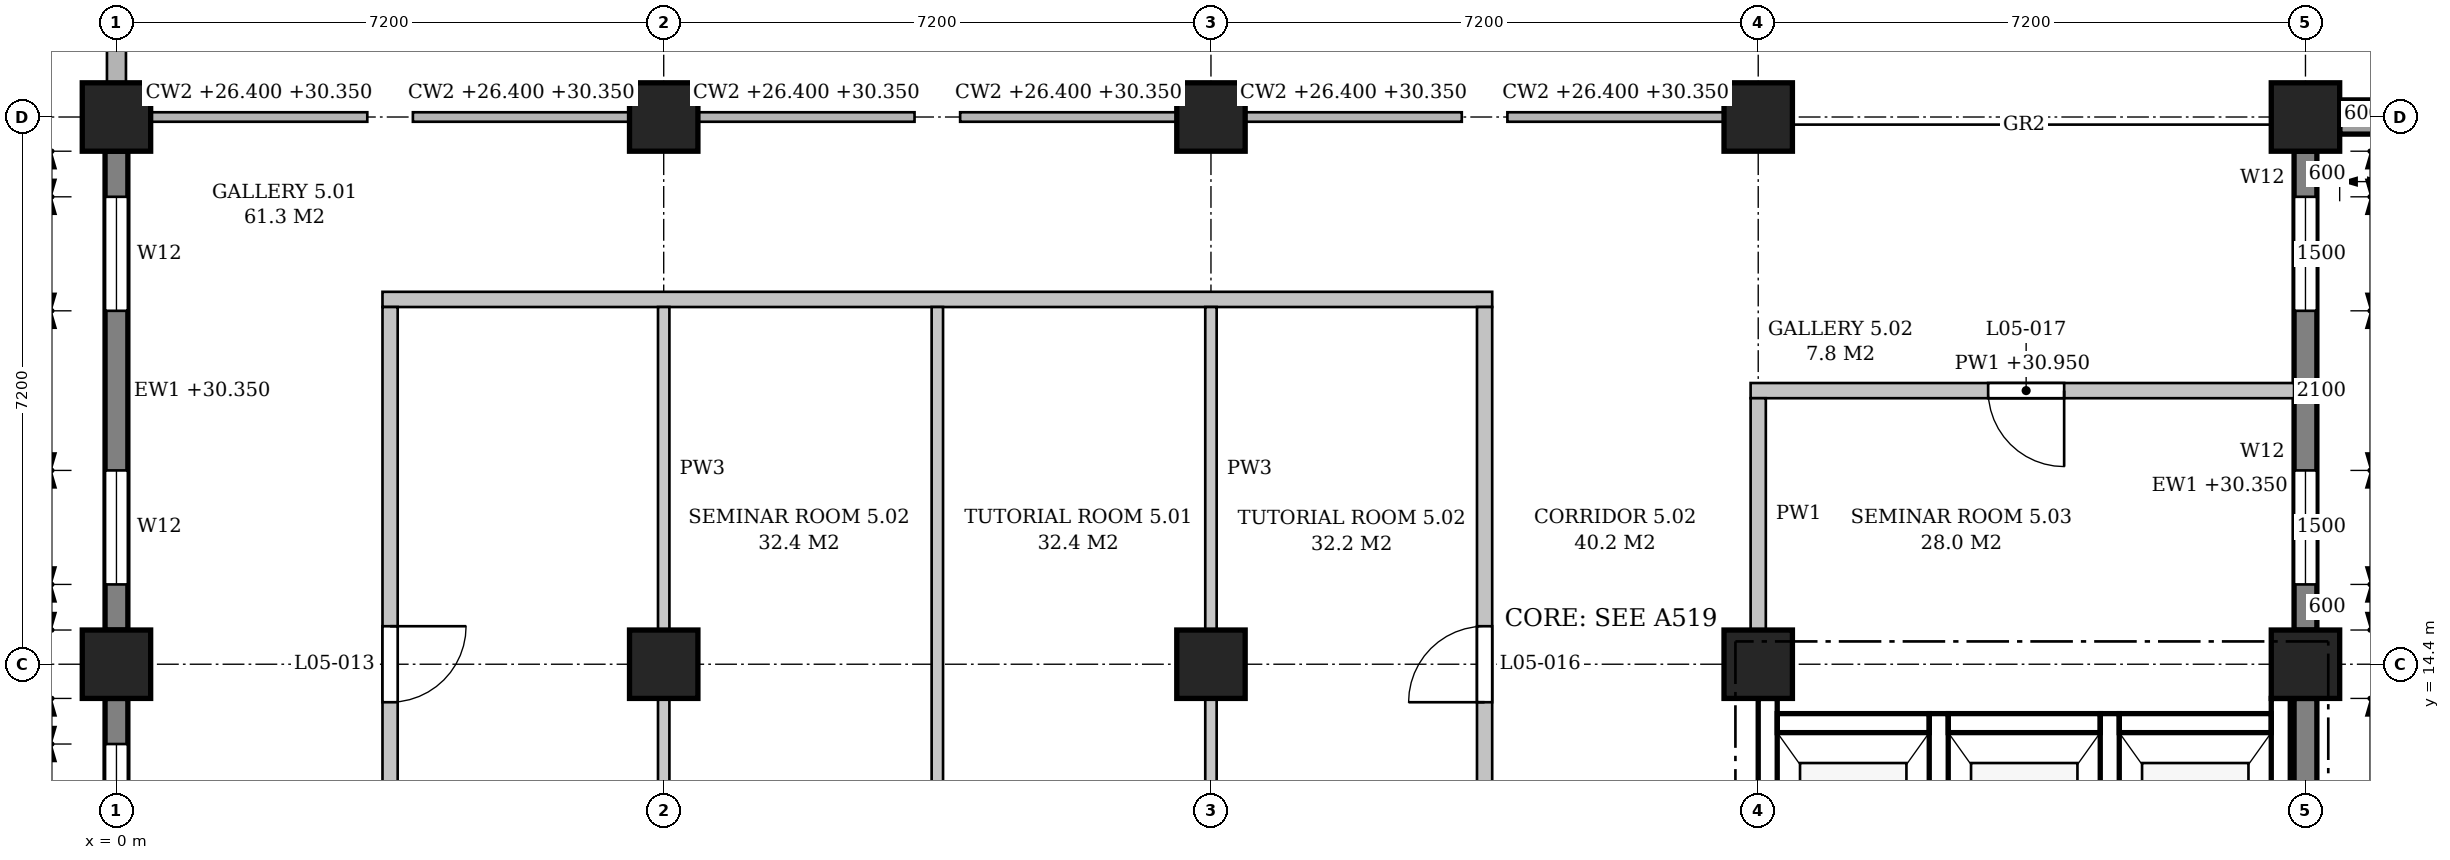
"""IFC4 building model, lengths in metres.
Left out: names, types, materials, properties, quantities, classifications, styles, units other than length and angle.
Written with IfcOpenShell. Run it as: python <this file> out.ifc"""

import sys

from ifc_helpers import new_model, si_unit, direction, frame, frame_2d, origin, origin_2d, place, context, subcontext, project, spatial, polyline, rectangle, outline, extrude, element, fill, save


model = new_model("IFC4")
c1 = context("Model", 3, precision=1e-05, world=origin(), true_north=direction((0.0, 1.0)))
c2 = subcontext(c1, "Body", "Model", "MODEL_VIEW")
j1 = project(units=[si_unit("LENGTHUNIT", "METRE"), si_unit("PLANEANGLEUNIT", "RADIAN")], contexts=[c1])
p1 = place(None, origin())
s1 = spatial("IfcSite", under=j1, at=p1, CompositionType="ELEMENT")
p2 = place(p1, origin())
s2 = spatial("IfcBuilding", under=s1, at=p2, CompositionType="ELEMENT")
p3 = place(p2, frame((0.0, 0.0, 26.4)))
s3 = spatial("IfcBuildingStorey", under=s2, at=p3, CompositionType="ELEMENT", Elevation=26.4)
for number, where, z_axis, x_axis in (
    (1, (0.0, 14.4, 0.0), (0.0, 0.0, 1.0), (1.0, 0.0, 0.0)),
    (2, (0.0, 21.6, 0.0), (0.0, 0.0, 1.0), (1.0, 0.0, 0.0)),
    (3, (7.2, 14.4, 0.0), (0.0, 0.0, 1.0), (1.0, 0.0, 0.0)),
    (4, (7.2, 21.6, 0.0), (0.0, 0.0, 1.0), (1.0, 0.0, 0.0)),
    (5, (14.4, 14.4, 0.0), (0.0, 0.0, 1.0), (1.0, 0.0, 0.0)),
    (6, (14.4, 21.6, 0.0), (0.0, 0.0, 1.0), (1.0, 0.0, 0.0)),
    (7, (21.6, 14.4, 0.0), (0.0, 0.0, 1.0), (1.0, 0.0, 0.0)),
    (8, (21.6, 21.6, 0.0), (0.0, 0.0, 1.0), (1.0, 0.0, 0.0)),
    (9, (28.8, 14.4, 0.0), (0.0, 0.0, 1.0), (1.0, 0.0, 0.0)),
    (10, (28.8, 21.6, 0.0), (0.0, 0.0, 1.0), (1.0, 0.0, 0.0)),
):
    element("IfcColumn", number, at=place(p3, frame(where, z_axis=z_axis, x_axis=x_axis)), inside=s3, PredefinedType="COLUMN", context=c2, shape_type="SweptSolid", body=[
        extrude(rectangle(XDim=0.9, YDim=0.9, at=origin_2d()), origin(), (0.0, 0.0, 1.0), 4.8),
    ])
p4 = place(p3, frame((0.0, 7.65, 0.0), z_axis=(0.0, 0.0, 1.0), x_axis=(0.0, 1.0, 0.0)))
e11 = element("IfcWall", 11, at=p4, inside=s3, PredefinedType="STANDARD", context=c2, shape_type="SweptSolid", body=[
    extrude(rectangle(XDim=6.3, YDim=0.3, at=frame_2d((3.15, 0.0))), origin(), (0.0, 0.0, 1.0), 3.95),
])
p5 = place(p4, frame((0.6, 0.0, 0.9)))
e12 = element("IfcOpeningElement", 12, at=p5, cuts=e11, PredefinedType="OPENING", context=c2, shape_type="SweptSolid", body=[
    extrude(outline(polyline([(0.0, 0.0), (1.5, 0.0), (1.5, 1.75), (0.75, 2.5), (0.0, 1.75), (0.0, 0.0)])), frame((0.0, 0.16, 0.0), z_axis=(0.0, -1.0, 0.0), x_axis=(1.0, 0.0, 0.0)), (0.0, 0.0, 1.0), 0.32),
])
p6 = place(p4, frame((4.2, 0.0, 0.9)))
e13 = element("IfcOpeningElement", 13, at=p6, cuts=e11, PredefinedType="OPENING", context=c2, shape_type="SweptSolid", body=[
    extrude(outline(polyline([(0.0, 0.0), (1.5, 0.0), (1.5, 1.75), (0.75, 2.5), (0.0, 1.75), (0.0, 0.0)])), frame((0.0, 0.16, 0.0), z_axis=(0.0, -1.0, 0.0), x_axis=(1.0, 0.0, 0.0)), (0.0, 0.0, 1.0), 0.32),
])
p7 = place(p3, frame((0.0, 14.85, 0.0), z_axis=(0.0, 0.0, 1.0), x_axis=(0.0, 1.0, 0.0)))
e14 = element("IfcWall", 14, at=p7, inside=s3, PredefinedType="STANDARD", context=c2, shape_type="SweptSolid", body=[
    extrude(rectangle(XDim=6.3, YDim=0.3, at=frame_2d((3.15, 0.0))), origin(), (0.0, 0.0, 1.0), 3.95),
])
p8 = place(p7, frame((0.6, 0.0, 0.9)))
e15 = element("IfcOpeningElement", 15, at=p8, cuts=e14, PredefinedType="OPENING", context=c2, shape_type="SweptSolid", body=[
    extrude(outline(polyline([(0.0, 0.0), (1.5, 0.0), (1.5, 1.75), (0.75, 2.5), (0.0, 1.75), (0.0, 0.0)])), frame((0.0, 0.16, 0.0), z_axis=(0.0, -1.0, 0.0), x_axis=(1.0, 0.0, 0.0)), (0.0, 0.0, 1.0), 0.32),
])
p9 = place(p7, frame((4.2, 0.0, 0.9)))
e16 = element("IfcOpeningElement", 16, at=p9, cuts=e14, PredefinedType="OPENING", context=c2, shape_type="SweptSolid", body=[
    extrude(outline(polyline([(0.0, 0.0), (1.5, 0.0), (1.5, 1.75), (0.75, 2.5), (0.0, 1.75), (0.0, 0.0)])), frame((0.0, 0.16, 0.0), z_axis=(0.0, -1.0, 0.0), x_axis=(1.0, 0.0, 0.0)), (0.0, 0.0, 1.0), 0.32),
])
p10 = place(p3, frame((28.8, 7.65, 0.0), z_axis=(0.0, 0.0, 1.0), x_axis=(0.0, 1.0, 0.0)))
e17 = element("IfcWall", 17, at=p10, inside=s3, PredefinedType="STANDARD", context=c2, shape_type="SweptSolid", body=[
    extrude(rectangle(XDim=6.3, YDim=0.3, at=frame_2d((3.15, 0.0))), origin(), (0.0, 0.0, 1.0), 3.95),
])
p11 = place(p10, frame((0.6, 0.0, 0.9)))
e18 = element("IfcOpeningElement", 18, at=p11, cuts=e17, PredefinedType="OPENING", context=c2, shape_type="SweptSolid", body=[
    extrude(outline(polyline([(0.0, 0.0), (1.5, 0.0), (1.5, 1.75), (0.75, 2.5), (0.0, 1.75), (0.0, 0.0)])), frame((0.0, 0.16, 0.0), z_axis=(0.0, -1.0, 0.0), x_axis=(1.0, 0.0, 0.0)), (0.0, 0.0, 1.0), 0.32),
])
p12 = place(p3, frame((28.8, 14.85, 0.0), z_axis=(0.0, 0.0, 1.0), x_axis=(0.0, 1.0, 0.0)))
e19 = element("IfcWall", 19, at=p12, inside=s3, PredefinedType="STANDARD", context=c2, shape_type="SweptSolid", body=[
    extrude(rectangle(XDim=6.3, YDim=0.3, at=frame_2d((3.15, 0.0))), origin(), (0.0, 0.0, 1.0), 3.95),
])
p13 = place(p12, frame((0.6, 0.0, 0.9)))
e20 = element("IfcOpeningElement", 20, at=p13, cuts=e19, PredefinedType="OPENING", context=c2, shape_type="SweptSolid", body=[
    extrude(outline(polyline([(0.0, 0.0), (1.5, 0.0), (1.5, 1.75), (0.75, 2.5), (0.0, 1.75), (0.0, 0.0)])), frame((0.0, 0.16, 0.0), z_axis=(0.0, -1.0, 0.0), x_axis=(1.0, 0.0, 0.0)), (0.0, 0.0, 1.0), 0.32),
])
p14 = place(p12, frame((4.2, 0.0, 0.9)))
e21 = element("IfcOpeningElement", 21, at=p14, cuts=e19, PredefinedType="OPENING", context=c2, shape_type="SweptSolid", body=[
    extrude(outline(polyline([(0.0, 0.0), (1.5, 0.0), (1.5, 1.75), (0.75, 2.5), (0.0, 1.75), (0.0, 0.0)])), frame((0.0, 0.16, 0.0), z_axis=(0.0, -1.0, 0.0), x_axis=(1.0, 0.0, 0.0)), (0.0, 0.0, 1.0), 0.32),
])
p15 = place(p3, frame((29.25, 21.6, 0.0), z_axis=(0.0, 0.0, 1.0), x_axis=(1.0, 0.0, 0.0)))
e22 = element("IfcWall", 22, at=p15, inside=s3, PredefinedType="STANDARD", context=c2, shape_type="SweptSolid", body=[
    extrude(rectangle(XDim=6.375, YDim=0.45, at=frame_2d((3.188, 0.0))), origin(), (0.0, 0.0, 1.0), 3.5),
])
p16 = place(p15, frame((0.6, 0.0, 0.9)))
e23 = element("IfcOpeningElement", 23, at=p16, cuts=e22, PredefinedType="OPENING", context=c2, shape_type="SweptSolid", body=[
    extrude(outline(polyline([(0.0, 0.0), (1.5, 0.0), (1.5, 1.75), (0.75, 2.5), (0.0, 1.75), (0.0, 0.0)])), frame((0.0, 0.235, 0.0), z_axis=(0.0, -1.0, 0.0), x_axis=(1.0, 0.0, 0.0)), (0.0, 0.0, 1.0), 0.47),
])
p17 = place(p15, frame((4.2, 0.0, 0.9)))
e24 = element("IfcOpeningElement", 24, at=p17, cuts=e22, PredefinedType="OPENING", context=c2, shape_type="SweptSolid", body=[
    extrude(outline(polyline([(0.0, 0.0), (1.5, 0.0), (1.5, 1.75), (0.75, 2.5), (0.0, 1.75), (0.0, 0.0)])), frame((0.0, 0.235, 0.0), z_axis=(0.0, -1.0, 0.0), x_axis=(1.0, 0.0, 0.0)), (0.0, 0.0, 1.0), 0.47),
])
p18 = place(p3, frame((21.725, 10.45, -0.25), z_axis=(0.0, 0.0, 1.0), x_axis=(0.0, 1.0, 0.0)))
e25 = element("IfcWall", 25, at=p18, inside=s3, PredefinedType="SHEAR", context=c2, shape_type="SweptSolid", body=[
    extrude(rectangle(XDim=3.5, YDim=0.25, at=frame_2d((1.75, 0.0))), origin(), (0.0, 0.0, 1.0), 4.05),
])
for number, where, z_axis, x_axis in (
    (26, (23.975, 10.45, -0.25), (0.0, 0.0, 1.0), (0.0, 1.0, 0.0)),
    (27, (26.225, 10.45, -0.25), (0.0, 0.0, 1.0), (0.0, 1.0, 0.0)),
):
    element("IfcWall", number, at=place(p3, frame(where, z_axis=z_axis, x_axis=x_axis)), inside=s3, PredefinedType="SHEAR", context=c2, shape_type="SweptSolid", body=[
        extrude(rectangle(XDim=3.3, YDim=0.25, at=frame_2d((1.65, 0.0))), origin(), (0.0, 0.0, 1.0), 4.8),
    ])
p19 = place(p3, frame((28.475, 10.45, -0.25), z_axis=(0.0, 0.0, 1.0), x_axis=(0.0, 1.0, 0.0)))
e28 = element("IfcWall", 28, at=p19, inside=s3, PredefinedType="SHEAR", context=c2, shape_type="SweptSolid", body=[
    extrude(rectangle(XDim=3.5, YDim=0.25, at=frame_2d((1.75, 0.0))), origin(), (0.0, 0.0, 1.0), 4.8),
])
for number, where, z_axis, x_axis in (
    (29, (21.85, 13.625, -0.25), (0.0, 0.0, 1.0), (1.0, 0.0, 0.0)),
    (30, (24.1, 13.625, -0.25), (0.0, 0.0, 1.0), (1.0, 0.0, 0.0)),
    (31, (26.35, 13.625, -0.25), (0.0, 0.0, 1.0), (1.0, 0.0, 0.0)),
):
    element("IfcWall", number, at=place(p3, frame(where, z_axis=z_axis, x_axis=x_axis)), inside=s3, PredefinedType="SHEAR", context=c2, shape_type="SweptSolid", body=[
        extrude(rectangle(XDim=2.0, YDim=0.25, at=frame_2d((1.0, 0.0))), origin(), (0.0, 0.0, 1.0), 4.8),
    ])
p20 = place(p3, frame((21.5, 18.0, 0.0), z_axis=(0.0, 0.0, 1.0), x_axis=(1.0, 0.0, 0.0)))
e32 = element("IfcWall", 32, at=p20, inside=s3, PredefinedType="PARTITIONING", context=c2, shape_type="SweptSolid", body=[
    extrude(outline(polyline([(0.0, 0.0), (7.15, 0.0), (7.15, 3.95), (7.05, 3.95), (7.05, 4.55), (0.35, 4.55), (0.35, 3.8), (0.0, 3.8), (0.0, 0.0)])), frame((0.0, 0.1, 0.0), z_axis=(0.0, -1.0, 0.0), x_axis=(1.0, 0.0, 0.0)), (0.0, 0.0, 1.0), 0.2),
])
p21 = place(p20, frame((3.125, 0.0, 0.0)))
e33 = element("IfcOpeningElement", 33, at=p21, cuts=e32, PredefinedType="OPENING", context=c2, shape_type="SweptSolid", body=[
    extrude(rectangle(XDim=1.0, YDim=2.1, at=frame_2d((0.5, 1.05))), frame((0.0, 0.11, 0.0), z_axis=(0.0, -1.0, 0.0), x_axis=(1.0, 0.0, 0.0)), (0.0, 0.0, 1.0), 0.22),
])
p22 = place(p3, frame((3.5, 19.2, 0.0), z_axis=(0.0, 0.0, 1.0), x_axis=(1.0, 0.0, 0.0)))
e34 = element("IfcWall", 34, at=p22, inside=s3, PredefinedType="PARTITIONING", context=c2, shape_type="SweptSolid", body=[
    extrude(outline(polyline([(0.0, 0.0), (14.6, 0.0), (14.6, 4.55), (11.15, 4.55), (11.15, 3.8), (10.65, 3.8), (10.65, 4.55), (3.95, 4.55), (3.95, 3.8), (3.45, 3.8), (3.45, 4.55), (0.0, 4.55), (0.0, 0.0)])), frame((0.0, 0.1, 0.0), z_axis=(0.0, -1.0, 0.0), x_axis=(1.0, 0.0, 0.0)), (0.0, 0.0, 1.0), 0.2),
])
p23 = place(p3, frame((3.6, 9.7, 0.0), z_axis=(0.0, 0.0, 1.0), x_axis=(0.0, 1.0, 0.0)))
e35 = element("IfcWall", 35, at=p23, inside=s3, PredefinedType="PARTITIONING", context=c2, shape_type="SweptSolid", body=[
    extrude(outline(polyline([(0.0, 0.0), (9.4, 0.0), (9.4, 4.55), (4.95, 4.55), (4.95, 3.8), (4.45, 3.8), (4.45, 4.55), (0.0, 4.55), (0.0, 0.0)])), frame((0.0, 0.1, 0.0), z_axis=(0.0, -1.0, 0.0), x_axis=(1.0, 0.0, 0.0)), (0.0, 0.0, 1.0), 0.2),
])
p24 = place(p23, frame((4.2, 0.0, 0.0)))
e36 = element("IfcOpeningElement", 36, at=p24, cuts=e35, PredefinedType="OPENING", context=c2, shape_type="SweptSolid", body=[
    extrude(rectangle(XDim=1.0, YDim=2.1, at=frame_2d((0.5, 1.05))), frame((0.0, 0.11, 0.0), z_axis=(0.0, -1.0, 0.0), x_axis=(1.0, 0.0, 0.0)), (0.0, 0.0, 1.0), 0.22),
])
for number, where, z_axis, x_axis in (
    (37, (7.2, 9.7, 0.0), (0.0, 0.0, 1.0), (0.0, 1.0, 0.0)),
    (38, (7.2, 14.85, 0.0), (0.0, 0.0, 1.0), (0.0, 1.0, 0.0)),
):
    element("IfcWall", number, at=place(p3, frame(where, z_axis=z_axis, x_axis=x_axis)), inside=s3, PredefinedType="PARTITIONING", context=c2, shape_type="SweptSolid", body=[
        extrude(rectangle(XDim=4.25, YDim=0.15, at=frame_2d((2.125, 0.0))), origin(), (0.0, 0.0, 1.0), 3.8),
    ])
p25 = place(p3, frame((10.8, 9.7, 0.0), z_axis=(0.0, 0.0, 1.0), x_axis=(0.0, 1.0, 0.0)))
e39 = element("IfcWall", 39, at=p25, inside=s3, PredefinedType="PARTITIONING", context=c2, shape_type="SweptSolid", body=[
    extrude(rectangle(XDim=9.4, YDim=0.15, at=frame_2d((4.7, 0.0))), origin(), (0.0, 0.0, 1.0), 3.8),
])
for number, where, z_axis, x_axis in (
    (40, (14.4, 9.7, 0.0), (0.0, 0.0, 1.0), (0.0, 1.0, 0.0)),
    (41, (14.4, 14.85, 0.0), (0.0, 0.0, 1.0), (0.0, 1.0, 0.0)),
):
    element("IfcWall", number, at=place(p3, frame(where, z_axis=z_axis, x_axis=x_axis)), inside=s3, PredefinedType="PARTITIONING", context=c2, shape_type="SweptSolid", body=[
        extrude(rectangle(XDim=4.25, YDim=0.15, at=frame_2d((2.125, 0.0))), origin(), (0.0, 0.0, 1.0), 3.8),
    ])
p26 = place(p3, frame((18.0, 9.7, 0.0), z_axis=(0.0, 0.0, 1.0), x_axis=(0.0, 1.0, 0.0)))
e42 = element("IfcWall", 42, at=p26, inside=s3, PredefinedType="PARTITIONING", context=c2, shape_type="SweptSolid", body=[
    extrude(outline(polyline([(0.0, 0.0), (9.4, 0.0), (9.4, 4.55), (4.95, 4.55), (4.95, 3.8), (4.45, 3.8), (4.45, 4.55), (0.0, 4.55), (0.0, 0.0)])), frame((0.0, 0.1, 0.0), z_axis=(0.0, -1.0, 0.0), x_axis=(1.0, 0.0, 0.0)), (0.0, 0.0, 1.0), 0.2),
])
p27 = place(p26, frame((4.2, 0.0, 0.0)))
e43 = element("IfcOpeningElement", 43, at=p27, cuts=e42, PredefinedType="OPENING", context=c2, shape_type="SweptSolid", body=[
    extrude(rectangle(XDim=1.0, YDim=2.1, at=frame_2d((0.5, 1.05))), frame((0.0, 0.11, 0.0), z_axis=(0.0, -1.0, 0.0), x_axis=(1.0, 0.0, 0.0)), (0.0, 0.0, 1.0), 0.22),
])
p28 = place(p3, frame((21.6, 14.85, 0.0), z_axis=(0.0, 0.0, 1.0), x_axis=(0.0, 1.0, 0.0)))
e44 = element("IfcWall", 44, at=p28, inside=s3, PredefinedType="PARTITIONING", context=c2, shape_type="SweptSolid", body=[
    extrude(rectangle(XDim=3.05, YDim=0.2, at=frame_2d((1.525, 0.0))), origin(), (0.0, 0.0, 1.0), 3.8),
])
p29 = place(p13, origin())
e45 = element("IfcWindow", 45, at=p29, inside=s3, PartitioningType="SINGLE_PANEL", PredefinedType="WINDOW", context=c2, shape_type="SweptSolid", body=[
    extrude(outline(polyline([(0.0, 0.0), (1.5, 0.0), (1.5, 1.75), (0.75, 2.5), (0.0, 1.75), (0.0, 0.0)])), frame((0.0, 0.03, 0.0), z_axis=(0.0, -1.0, 0.0), x_axis=(1.0, 0.0, 0.0)), (0.0, 0.0, 1.0), 0.06),
])
fill(e20, e45)
p30 = place(p14, origin())
e46 = element("IfcWindow", 46, at=p30, inside=s3, PartitioningType="SINGLE_PANEL", PredefinedType="WINDOW", context=c2, shape_type="SweptSolid", body=[
    extrude(outline(polyline([(0.0, 0.0), (1.5, 0.0), (1.5, 1.75), (0.75, 2.5), (0.0, 1.75), (0.0, 0.0)])), frame((0.0, 0.03, 0.0), z_axis=(0.0, -1.0, 0.0), x_axis=(1.0, 0.0, 0.0)), (0.0, 0.0, 1.0), 0.06),
])
fill(e21, e46)
p31 = place(p6, origin())
e47 = element("IfcWindow", 47, at=p31, inside=s3, PartitioningType="SINGLE_PANEL", PredefinedType="WINDOW", context=c2, shape_type="SweptSolid", body=[
    extrude(outline(polyline([(0.0, 0.0), (1.5, 0.0), (1.5, 1.75), (0.75, 2.5), (0.0, 1.75), (0.0, 0.0)])), frame((0.0, 0.03, 0.0), z_axis=(0.0, -1.0, 0.0), x_axis=(1.0, 0.0, 0.0)), (0.0, 0.0, 1.0), 0.06),
])
fill(e13, e47)
p32 = place(p8, origin())
e48 = element("IfcWindow", 48, at=p32, inside=s3, PartitioningType="SINGLE_PANEL", PredefinedType="WINDOW", context=c2, shape_type="SweptSolid", body=[
    extrude(outline(polyline([(0.0, 0.0), (1.5, 0.0), (1.5, 1.75), (0.75, 2.5), (0.0, 1.75), (0.0, 0.0)])), frame((0.0, 0.03, 0.0), z_axis=(0.0, -1.0, 0.0), x_axis=(1.0, 0.0, 0.0)), (0.0, 0.0, 1.0), 0.06),
])
fill(e15, e48)
p33 = place(p9, origin())
e49 = element("IfcWindow", 49, at=p33, inside=s3, PartitioningType="SINGLE_PANEL", PredefinedType="WINDOW", context=c2, shape_type="SweptSolid", body=[
    extrude(outline(polyline([(0.0, 0.0), (1.5, 0.0), (1.5, 1.75), (0.75, 2.5), (0.0, 1.75), (0.0, 0.0)])), frame((0.0, 0.03, 0.0), z_axis=(0.0, -1.0, 0.0), x_axis=(1.0, 0.0, 0.0)), (0.0, 0.0, 1.0), 0.06),
])
fill(e16, e49)
p34 = place(p24, frame((1.0, 0.0, 0.0), z_axis=(0.0, 0.0, 1.0), x_axis=(-1.0, 0.0, 0.0)))
e50 = element("IfcDoor", 50, at=p34, inside=s3, OperationType="SINGLE_SWING_LEFT", PredefinedType="DOOR", context=c2, shape_type="SweptSolid", body=[
    extrude(rectangle(XDim=1.0, YDim=2.1, at=frame_2d((0.5, 1.05))), frame((0.0, 0.025, 0.0), z_axis=(0.0, -1.0, 0.0), x_axis=(1.0, 0.0, 0.0)), (0.0, 0.0, 1.0), 0.05),
])
fill(e36, e50)
p35 = place(p27, origin())
e51 = element("IfcDoor", 51, at=p35, inside=s3, OperationType="SINGLE_SWING_LEFT", PredefinedType="DOOR", context=c2, shape_type="SweptSolid", body=[
    extrude(rectangle(XDim=1.0, YDim=2.1, at=frame_2d((0.5, 1.05))), frame((0.0, 0.025, 0.0), z_axis=(0.0, -1.0, 0.0), x_axis=(1.0, 0.0, 0.0)), (0.0, 0.0, 1.0), 0.05),
])
fill(e43, e51)
p36 = place(p21, frame((1.0, 0.0, 0.0), z_axis=(0.0, 0.0, 1.0), x_axis=(-1.0, 0.0, 0.0)))
e52 = element("IfcDoor", 52, at=p36, inside=s3, OperationType="SINGLE_SWING_LEFT", PredefinedType="DOOR", context=c2, shape_type="SweptSolid", body=[
    extrude(rectangle(XDim=1.0, YDim=2.1, at=frame_2d((0.5, 1.05))), frame((0.0, 0.025, 0.0), z_axis=(0.0, -1.0, 0.0), x_axis=(1.0, 0.0, 0.0)), (0.0, 0.0, 1.0), 0.05),
])
fill(e33, e52)
save(model, sys.argv[1])
